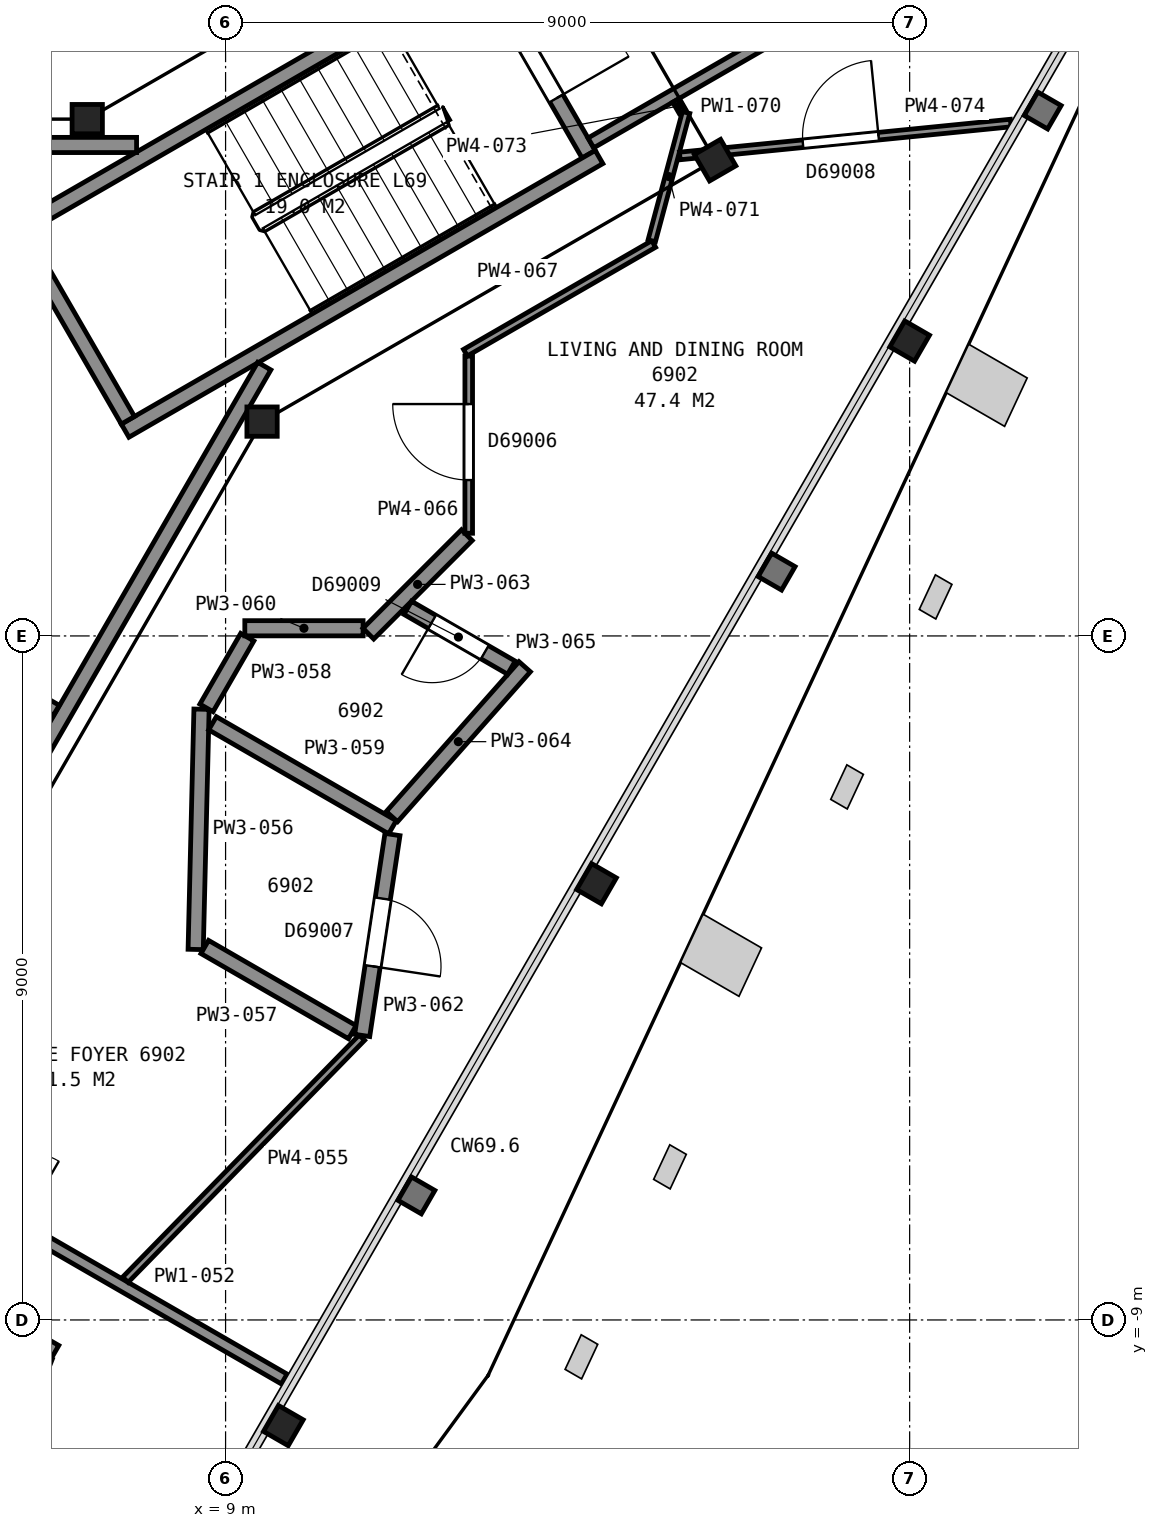
"""IFC4 building model, lengths in metres.
Left out: names, types, materials, properties, quantities, classifications, styles, units other than length and angle.
Written with IfcOpenShell. Run it as: python <this file> out.ifc"""

import sys

from ifc_helpers import new_model, si_unit, direction, frame, frame_2d, origin, origin_2d, place, context, subcontext, project, spatial, rectangle, i_section, extrude, element, fill, save


model = new_model("IFC4")
c1 = context("Model", 3, precision=1e-05, world=origin(), true_north=direction((0.0, 1.0)))
c2 = subcontext(c1, "Body", "Model", "MODEL_VIEW")
j1 = project(units=[si_unit("LENGTHUNIT", "METRE"), si_unit("PLANEANGLEUNIT", "RADIAN")], contexts=[c1])
p1 = place(None, origin())
s1 = spatial("IfcSite", under=j1, at=p1, CompositionType="ELEMENT")
p2 = place(p1, origin())
s2 = spatial("IfcBuilding", under=s1, at=p2, CompositionType="ELEMENT")
p3 = place(p2, frame((0.0, 0.0, 275.1)))
s3 = spatial("IfcBuildingStorey", under=s2, at=p3, CompositionType="ELEMENT", Elevation=275.1)
for number, where, z_axis, x_axis in (
    (1, (9.76, -10.39, 0.0), (0.0, 0.0, 1.0), (-0.5, -0.866, 0.0)),
    (2, (13.88, -3.26, 0.0), (0.0, 0.0, 1.0), (-0.5, -0.866, 0.0)),
    (3, (18.0, 3.88, 0.0), (0.0, 0.0, 1.0), (-0.5, -0.866, 0.0)),
):
    element("IfcColumn", number, at=place(p3, frame(where, z_axis=z_axis, x_axis=x_axis)), inside=s3, PredefinedType="COLUMN", context=c2, shape_type="SweptSolid", body=[
        extrude(i_section(OverallWidth=0.394, OverallDepth=0.376, WebThickness=0.017, FlangeThickness=0.028, FilletRadius=0.015, at=origin_2d()), origin(), (0.0, 0.0, 1.0), 3.7),
    ])
p4 = place(p3, frame((9.48, 2.82, 0.0), z_axis=(0.0, 0.0, 1.0), x_axis=(1.0, 0.0, 0.0)))
e4 = element("IfcColumn", 4, at=p4, inside=s3, PredefinedType="COLUMN", context=c2, shape_type="SweptSolid", body=[
    extrude(i_section(OverallWidth=0.399, OverallDepth=0.386, WebThickness=0.021, FlangeThickness=0.033, FilletRadius=0.015, at=origin_2d()), origin(), (0.0, 0.0, 1.0), 3.7),
])
p5 = place(p3, frame((15.44, 6.26, 0.0), z_axis=(0.0, 0.0, 1.0), x_axis=(0.5, -0.866025403784, 0.0)))
e5 = element("IfcColumn", 5, at=p5, inside=s3, PredefinedType="COLUMN", context=c2, shape_type="SweptSolid", body=[
    extrude(i_section(OverallWidth=0.401, OverallDepth=0.399, WebThickness=0.025, FlangeThickness=0.04, FilletRadius=0.015, at=origin_2d()), origin(), (0.0, 0.0, 1.0), 3.7),
])
p6 = place(p3, frame((7.18, 6.8, 0.0), z_axis=(0.0, 0.0, 1.0), x_axis=(1.0, 0.0, 0.0)))
e6 = element("IfcColumn", 6, at=p6, inside=s3, PredefinedType="COLUMN", context=c2, shape_type="SweptSolid", body=[
    extrude(i_section(OverallWidth=0.399, OverallDepth=0.386, WebThickness=0.021, FlangeThickness=0.033, FilletRadius=0.015, at=origin_2d()), origin(), (0.0, 0.0, 1.0), 3.7),
])
p7 = place(p3, frame((13.777, 6.338, 0.0), z_axis=(0.0, 0.0, 1.0), x_axis=(-0.500049511043, 0.865996816683, 0.0)))
e7 = element("IfcWall", 7, at=p7, inside=s3, PredefinedType="PARTITIONING", context=c2, shape_type="SweptSolid", body=[
    extrude(rectangle(XDim=2.8, YDim=0.2, at=frame_2d((1.4, 0.0))), origin(), (0.0, 0.0, 1.0), 3.45),
])
p8 = place(p7, frame((0.85, 0.0, 0.0)))
e8 = element("IfcOpeningElement", 8, at=p8, cuts=e7, PredefinedType="OPENING", context=c2, shape_type="SweptSolid", body=[
    extrude(rectangle(XDim=1.1, YDim=2.1, at=frame_2d((0.55, 1.05))), frame((0.0, 0.11, 0.0), z_axis=(0.0, -1.0, 0.0), x_axis=(1.0, 0.0, 0.0)), (0.0, 0.0, 1.0), 0.22),
])
for number, where, z_axis, x_axis in (
    (9, (6.178, 5.299, 0.0), (0.0, 0.0, 1.0), (0.866, 0.5, 0.0)),
    (10, (7.678, 2.701, 0.0), (0.0, 0.0, 1.0), (0.866, 0.5, 0.0)),
):
    element("IfcWall", number, at=place(p3, frame(where, z_axis=z_axis, x_axis=x_axis)), inside=s3, PredefinedType="PARTITIONING", context=c2, shape_type="SweptSolid", body=[
        extrude(rectangle(XDim=7.2, YDim=0.2, at=frame_2d((3.6, 0.0))), origin(), (0.0, 0.0, 1.0), 3.45),
    ])
p9 = place(p3, frame((7.715, 2.838, 0.0), z_axis=(0.0, 0.0, 1.0), x_axis=(-0.500049511043, 0.865996816683, 0.0)))
e11 = element("IfcWall", 11, at=p9, inside=s3, PredefinedType="PARTITIONING", context=c2, shape_type="SweptSolid", body=[
    extrude(rectangle(XDim=2.8, YDim=0.2, at=frame_2d((1.4, 0.0))), origin(), (0.0, 0.0, 1.0), 3.45),
])
p10 = place(p3, frame((7.829, 6.46, 0.0), z_axis=(0.0, 0.0, 1.0), x_axis=(-1.0, 0.0, 0.0)))
e12 = element("IfcWall", 12, at=p10, inside=s3, PredefinedType="PARTITIONING", context=c2, shape_type="SweptSolid", body=[
    extrude(rectangle(XDim=15.658, YDim=0.2, at=frame_2d((7.829, 0.0))), origin(), (0.0, 0.0, 1.0), 3.45),
])
p11 = place(p10, frame((12.168, 0.0, 0.0)))
e13 = element("IfcOpeningElement", 13, at=p11, cuts=e12, PredefinedType="OPENING", context=c2, shape_type="SweptSolid", body=[
    extrude(rectangle(XDim=1.2, YDim=2.1, at=frame_2d((0.6, 1.05))), frame((0.0, 0.11, 0.0), z_axis=(0.0, -1.0, 0.0), x_axis=(1.0, 0.0, 0.0)), (0.0, 0.0, 1.0), 0.22),
])
p12 = place(p3, frame((3.828, -6.29, 0.0), z_axis=(0.0, 0.0, 1.0), x_axis=(0.499979739078, 0.866037101117, 0.0)))
e14 = element("IfcWall", 14, at=p12, inside=s3, PredefinedType="PARTITIONING", context=c2, shape_type="SweptSolid", body=[
    extrude(rectangle(XDim=11.363, YDim=0.2, at=frame_2d((5.681, 0.0))), origin(), (0.0, 0.0, 1.0), 3.45),
])
p13 = place(p12, frame((0.55, 0.0, 0.0)))
e15 = element("IfcOpeningElement", 15, at=p13, cuts=e14, PredefinedType="OPENING", context=c2, shape_type="SweptSolid", body=[
    extrude(rectangle(XDim=1.2, YDim=2.1, at=frame_2d((0.6, 1.05))), frame((0.0, 0.11, 0.0), z_axis=(0.0, -1.0, 0.0), x_axis=(1.0, 0.0, 0.0)), (0.0, 0.0, 1.0), 0.22),
])
p14 = place(p3, frame((6.774, -0.978, 0.0), z_axis=(0.0, 0.0, 1.0), x_axis=(-0.866062920605, 0.499935013329, 0.0)))
e16 = element("IfcWall", 16, at=p14, inside=s3, PredefinedType="PARTITIONING", context=c2, shape_type="SweptSolid", body=[
    extrude(rectangle(XDim=2.22, YDim=0.15, at=frame_2d((1.11, 0.0))), origin(), (0.0, 0.0, 1.0), 3.45),
])
p15 = place(p14, frame((0.646, 0.0, 0.0)))
e17 = element("IfcOpeningElement", 17, at=p15, cuts=e16, PredefinedType="OPENING", context=c2, shape_type="SweptSolid", body=[
    extrude(rectangle(XDim=0.9, YDim=2.1, at=frame_2d((0.45, 1.05))), frame((0.0, 0.085, 0.0), z_axis=(0.0, -1.0, 0.0), x_axis=(1.0, 0.0, 0.0)), (0.0, 0.0, 1.0), 0.17),
])
p16 = place(p3, frame((3.498, -7.541, 0.0), z_axis=(0.0, 0.0, 1.0), x_axis=(0.865985624761, -0.500068892961, 0.0)))
e18 = element("IfcWall", 18, at=p16, inside=s3, PredefinedType="PARTITIONING", context=c2, shape_type="SweptSolid", body=[
    extrude(rectangle(XDim=3.762, YDim=0.2, at=frame_2d((1.881, 0.0))), origin(), (0.0, 0.0, 1.0), 2.723),
])
p17 = place(p3, frame((9.772, -9.777, 0.0), z_axis=(0.0, 0.0, 1.0), x_axis=(-0.866083818164, 0.499898809675, 0.0)))
e19 = element("IfcWall", 19, at=p17, inside=s3, PredefinedType="PARTITIONING", context=c2, shape_type="SweptSolid", body=[
    extrude(rectangle(XDim=6.551, YDim=0.15, at=frame_2d((3.275, 0.0))), origin(), (0.0, 0.0, 1.0), 2.723),
])
p18 = place(p17, frame((4.001, 0.0, 0.0)))
e20 = element("IfcOpeningElement", 20, at=p18, cuts=e19, PredefinedType="OPENING", context=c2, shape_type="SweptSolid", body=[
    extrude(rectangle(XDim=1.0, YDim=2.1, at=frame_2d((0.5, 1.05))), frame((0.0, 0.085, 0.0), z_axis=(0.0, -1.0, 0.0), x_axis=(1.0, 0.0, 0.0)), (0.0, 0.0, 1.0), 0.17),
])
p19 = place(p3, frame((5.526, -12.29, 0.0), z_axis=(0.0, 0.0, 1.0), x_axis=(0.364786545928, 0.931091174864, 0.0)))
e21 = element("IfcWall", 21, at=p19, inside=s3, PredefinedType="PARTITIONING", context=c2, shape_type="SweptSolid", body=[
    extrude(rectangle(XDim=3.019, YDim=0.2, at=frame_2d((1.51, 0.0))), origin(), (0.0, 0.0, 1.0), 2.723),
])
p20 = place(p3, frame((7.682, -8.47, 0.0), z_axis=(0.0, 0.0, 1.0), x_axis=(0.698777378461, 0.715339203002, 0.0)))
e22 = element("IfcWall", 22, at=p20, inside=s3, PredefinedType="PARTITIONING", context=c2, shape_type="SweptSolid", body=[
    extrude(rectangle(XDim=4.452, YDim=0.1, at=frame_2d((2.226, 0.0))), origin(), (0.0, 0.0, 1.0), 2.723),
])
p21 = place(p3, frame((8.607, -4.125, 0.0), z_axis=(0.0, 0.0, 1.0), x_axis=(0.024245593124, 0.999706032399, 0.0)))
e23 = element("IfcWall", 23, at=p21, inside=s3, PredefinedType="PARTITIONING", context=c2, shape_type="SweptSolid", body=[
    extrude(rectangle(XDim=3.162, YDim=0.2, at=frame_2d((1.581, 0.0))), origin(), (0.0, 0.0, 1.0), 2.723),
])
p22 = place(p3, frame((8.726, -4.093, 0.0), z_axis=(0.0, 0.0, 1.0), x_axis=(0.866056839033, -0.499945548598, 0.0)))
e24 = element("IfcWall", 24, at=p22, inside=s3, PredefinedType="PARTITIONING", context=c2, shape_type="SweptSolid", body=[
    extrude(rectangle(XDim=2.242, YDim=0.2, at=frame_2d((1.121, 0.0))), origin(), (0.0, 0.0, 1.0), 2.723),
])
p23 = place(p3, frame((8.749, -0.947, 0.0), z_axis=(0.0, 0.0, 1.0), x_axis=(0.499656913366, 0.866223394354, 0.0)))
e25 = element("IfcWall", 25, at=p23, inside=s3, PredefinedType="PARTITIONING", context=c2, shape_type="SweptSolid", body=[
    extrude(rectangle(XDim=1.075, YDim=0.2, at=frame_2d((0.538, 0.0))), origin(), (0.0, 0.0, 1.0), 2.723),
])
p24 = place(p3, frame((8.828, -1.149, 0.0), z_axis=(0.0, 0.0, 1.0), x_axis=(0.865853899269, -0.50029693695, 0.0)))
e26 = element("IfcWall", 26, at=p24, inside=s3, PredefinedType="PARTITIONING", context=c2, shape_type="SweptSolid", body=[
    extrude(rectangle(XDim=2.734, YDim=0.2, at=frame_2d((1.367, 0.0))), origin(), (0.0, 0.0, 1.0), 2.723),
])
p25 = place(p3, frame((9.253, 0.101, 0.0), z_axis=(0.0, 0.0, 1.0), x_axis=(1.0, 0.0, 0.0)))
e27 = element("IfcWall", 27, at=p25, inside=s3, PredefinedType="PARTITIONING", context=c2, shape_type="SweptSolid", body=[
    extrude(rectangle(XDim=1.556, YDim=0.2, at=frame_2d((0.778, 0.0))), origin(), (0.0, 0.0, 1.0), 2.723),
])
p26 = place(p3, frame((10.797, -5.256, 0.0), z_axis=(0.0, 0.0, 1.0), x_axis=(0.148961207986, 0.988843040384, 0.0)))
e28 = element("IfcWall", 28, at=p26, inside=s3, PredefinedType="PARTITIONING", context=c2, shape_type="SweptSolid", body=[
    extrude(rectangle(XDim=2.673, YDim=0.2, at=frame_2d((1.336, 0.0))), origin(), (0.0, 0.0, 1.0), 2.723),
])
p27 = place(p26, frame((0.92, 0.0, 0.0)))
e29 = element("IfcOpeningElement", 29, at=p27, cuts=e28, PredefinedType="OPENING", context=c2, shape_type="SweptSolid", body=[
    extrude(rectangle(XDim=0.9, YDim=2.1, at=frame_2d((0.45, 1.05))), frame((0.0, 0.11, 0.0), z_axis=(0.0, -1.0, 0.0), x_axis=(1.0, 0.0, 0.0)), (0.0, 0.0, 1.0), 0.22),
])
p28 = place(p3, frame((10.878, 0.03, 0.0), z_axis=(0.0, 0.0, 1.0), x_axis=(0.707173379423, 0.707040176677, 0.0)))
e30 = element("IfcWall", 30, at=p28, inside=s3, PredefinedType="PARTITIONING", context=c2, shape_type="SweptSolid", body=[
    extrude(rectangle(XDim=1.833, YDim=0.2, at=frame_2d((0.917, 0.0))), origin(), (0.0, 0.0, 1.0), 2.723),
])
p29 = place(p3, frame((11.188, -2.377, 0.0), z_axis=(0.0, 0.0, 1.0), x_axis=(0.663045631266, 0.748578981043, 0.0)))
e31 = element("IfcWall", 31, at=p29, inside=s3, PredefinedType="PARTITIONING", context=c2, shape_type="SweptSolid", body=[
    extrude(rectangle(XDim=2.635, YDim=0.2, at=frame_2d((1.317, 0.0))), origin(), (0.0, 0.0, 1.0), 2.723),
])
p30 = place(p3, frame((12.761, -0.417, 0.0), z_axis=(0.0, 0.0, 1.0), x_axis=(-0.866030680601, 0.499990860175, 0.0)))
e32 = element("IfcWall", 32, at=p30, inside=s3, PredefinedType="PARTITIONING", context=c2, shape_type="SweptSolid", body=[
    extrude(rectangle(XDim=1.575, YDim=0.2, at=frame_2d((0.787, 0.0))), origin(), (0.0, 0.0, 1.0), 2.723),
])
p31 = place(p30, frame((0.405, 0.0, 0.0)))
e33 = element("IfcOpeningElement", 33, at=p31, cuts=e32, PredefinedType="OPENING", context=c2, shape_type="SweptSolid", body=[
    extrude(rectangle(XDim=0.8, YDim=2.1, at=frame_2d((0.4, 1.05))), frame((0.0, 0.11, 0.0), z_axis=(0.0, -1.0, 0.0), x_axis=(1.0, 0.0, 0.0)), (0.0, 0.0, 1.0), 0.22),
])
p32 = place(p3, frame((12.199, 3.682, 0.0), z_axis=(0.0, 0.0, 1.0), x_axis=(0.0, -1.0, 0.0)))
e34 = element("IfcWall", 34, at=p32, inside=s3, PredefinedType="PARTITIONING", context=c2, shape_type="SweptSolid", body=[
    extrude(rectangle(XDim=2.331, YDim=0.1, at=frame_2d((1.166, 0.0))), origin(), (0.0, 0.0, 1.0), 2.723),
])
p33 = place(p32, frame((0.631, 0.0, 0.0)))
e35 = element("IfcOpeningElement", 35, at=p33, cuts=e34, PredefinedType="OPENING", context=c2, shape_type="SweptSolid", body=[
    extrude(rectangle(XDim=1.0, YDim=2.1, at=frame_2d((0.5, 1.05))), frame((0.0, 0.06, 0.0), z_axis=(0.0, -1.0, 0.0), x_axis=(1.0, 0.0, 0.0)), (0.0, 0.0, 1.0), 0.12),
])
p34 = place(p3, frame((12.156, 3.727, 0.0), z_axis=(0.0, 0.0, 1.0), x_axis=(0.866012137121, 0.500022977831, 0.0)))
e36 = element("IfcWall", 36, at=p34, inside=s3, PredefinedType="PARTITIONING", context=c2, shape_type="SweptSolid", body=[
    extrude(rectangle(XDim=2.86, YDim=0.1, at=frame_2d((1.43, 0.0))), origin(), (0.0, 0.0, 1.0), 2.723),
])
p35 = place(p3, frame((13.806, 6.487, 0.0), z_axis=(0.0, 0.0, 1.0), x_axis=(0.866056369097, 0.49994636267, 0.0)))
e37 = element("IfcWall", 37, at=p35, inside=s3, PredefinedType="PARTITIONING", context=c2, shape_type="SweptSolid", body=[
    extrude(rectangle(XDim=2.8, YDim=0.15, at=frame_2d((1.4, 0.0))), origin(), (0.0, 0.0, 1.0), 2.723),
])
p36 = place(p3, frame((14.607, 5.2, 0.0), z_axis=(0.0, 0.0, 1.0), x_axis=(0.258549793661, 0.965997931777, 0.0)))
e38 = element("IfcWall", 38, at=p36, inside=s3, PredefinedType="PARTITIONING", context=c2, shape_type="SweptSolid", body=[
    extrude(rectangle(XDim=1.747, YDim=0.1, at=frame_2d((0.874, 0.0))), origin(), (0.0, 0.0, 1.0), 2.723),
])
p37 = place(p3, frame((14.927, 7.047, 0.0), z_axis=(0.0, 0.0, 1.0), x_axis=(0.497687197367, -0.867356589631, 0.0)))
e39 = element("IfcWall", 39, at=p37, inside=s3, PredefinedType="PARTITIONING", context=c2, shape_type="SweptSolid", body=[
    extrude(rectangle(XDim=0.17, YDim=0.1, at=frame_2d((0.085, 0.0))), origin(), (0.0, 0.0, 1.0), 2.723),
])
p38 = place(p3, frame((14.976, 6.315, 0.0), z_axis=(0.0, 0.0, 1.0), x_axis=(0.995082940066, 0.09904515329, 0.0)))
e40 = element("IfcWall", 40, at=p38, inside=s3, PredefinedType="PARTITIONING", context=c2, shape_type="SweptSolid", body=[
    extrude(rectangle(XDim=4.375, YDim=0.1, at=frame_2d((2.188, 0.0))), origin(), (0.0, 0.0, 1.0), 2.723),
])
p39 = place(p38, frame((1.628, 0.0, 0.0)))
e41 = element("IfcOpeningElement", 41, at=p39, cuts=e40, PredefinedType="OPENING", context=c2, shape_type="SweptSolid", body=[
    extrude(rectangle(XDim=1.0, YDim=2.1, at=frame_2d((0.5, 1.05))), frame((0.0, 0.06, 0.0), z_axis=(0.0, -1.0, 0.0), x_axis=(1.0, 0.0, 0.0)), (0.0, 0.0, 1.0), 0.12),
])
p40 = place(p8, origin())
e42 = element("IfcDoor", 42, at=p40, inside=s3, OperationType="SINGLE_SWING_LEFT", PredefinedType="DOOR", context=c2, shape_type="SweptSolid", body=[
    extrude(rectangle(XDim=1.1, YDim=2.1, at=frame_2d((0.55, 1.05))), frame((0.0, 0.025, 0.0), z_axis=(0.0, -1.0, 0.0), x_axis=(1.0, 0.0, 0.0)), (0.0, 0.0, 1.0), 0.05),
])
fill(e8, e42)
p41 = place(p27, origin())
e43 = element("IfcDoor", 43, at=p41, inside=s3, OperationType="SINGLE_SWING_LEFT", PredefinedType="DOOR", context=c2, shape_type="SweptSolid", body=[
    extrude(rectangle(XDim=0.9, YDim=2.1, at=frame_2d((0.45, 1.05))), frame((0.0, 0.025, 0.0), z_axis=(0.0, -1.0, 0.0), x_axis=(1.0, 0.0, 0.0)), (0.0, 0.0, 1.0), 0.05),
])
fill(e29, e43)
p42 = place(p31, origin())
e44 = element("IfcDoor", 44, at=p42, inside=s3, OperationType="SINGLE_SWING_RIGHT", PredefinedType="DOOR", context=c2, shape_type="SweptSolid", body=[
    extrude(rectangle(XDim=0.8, YDim=2.1, at=frame_2d((0.4, 1.05))), frame((0.0, 0.025, 0.0), z_axis=(0.0, -1.0, 0.0), x_axis=(1.0, 0.0, 0.0)), (0.0, 0.0, 1.0), 0.05),
])
fill(e33, e44)
p43 = place(p33, origin())
e45 = element("IfcDoor", 45, at=p43, inside=s3, OperationType="SINGLE_SWING_LEFT", PredefinedType="DOOR", context=c2, shape_type="SweptSolid", body=[
    extrude(rectangle(XDim=1.0, YDim=2.1, at=frame_2d((0.5, 1.05))), frame((0.0, 0.025, 0.0), z_axis=(0.0, -1.0, 0.0), x_axis=(1.0, 0.0, 0.0)), (0.0, 0.0, 1.0), 0.05),
])
fill(e35, e45)
p44 = place(p39, origin())
e46 = element("IfcDoor", 46, at=p44, inside=s3, OperationType="SINGLE_SWING_RIGHT", PredefinedType="DOOR", context=c2, shape_type="SweptSolid", body=[
    extrude(rectangle(XDim=1.0, YDim=2.1, at=frame_2d((0.5, 1.05))), frame((0.0, 0.025, 0.0), z_axis=(0.0, -1.0, 0.0), x_axis=(1.0, 0.0, 0.0)), (0.0, 0.0, 1.0), 0.05),
])
fill(e41, e46)
save(model, sys.argv[1])
